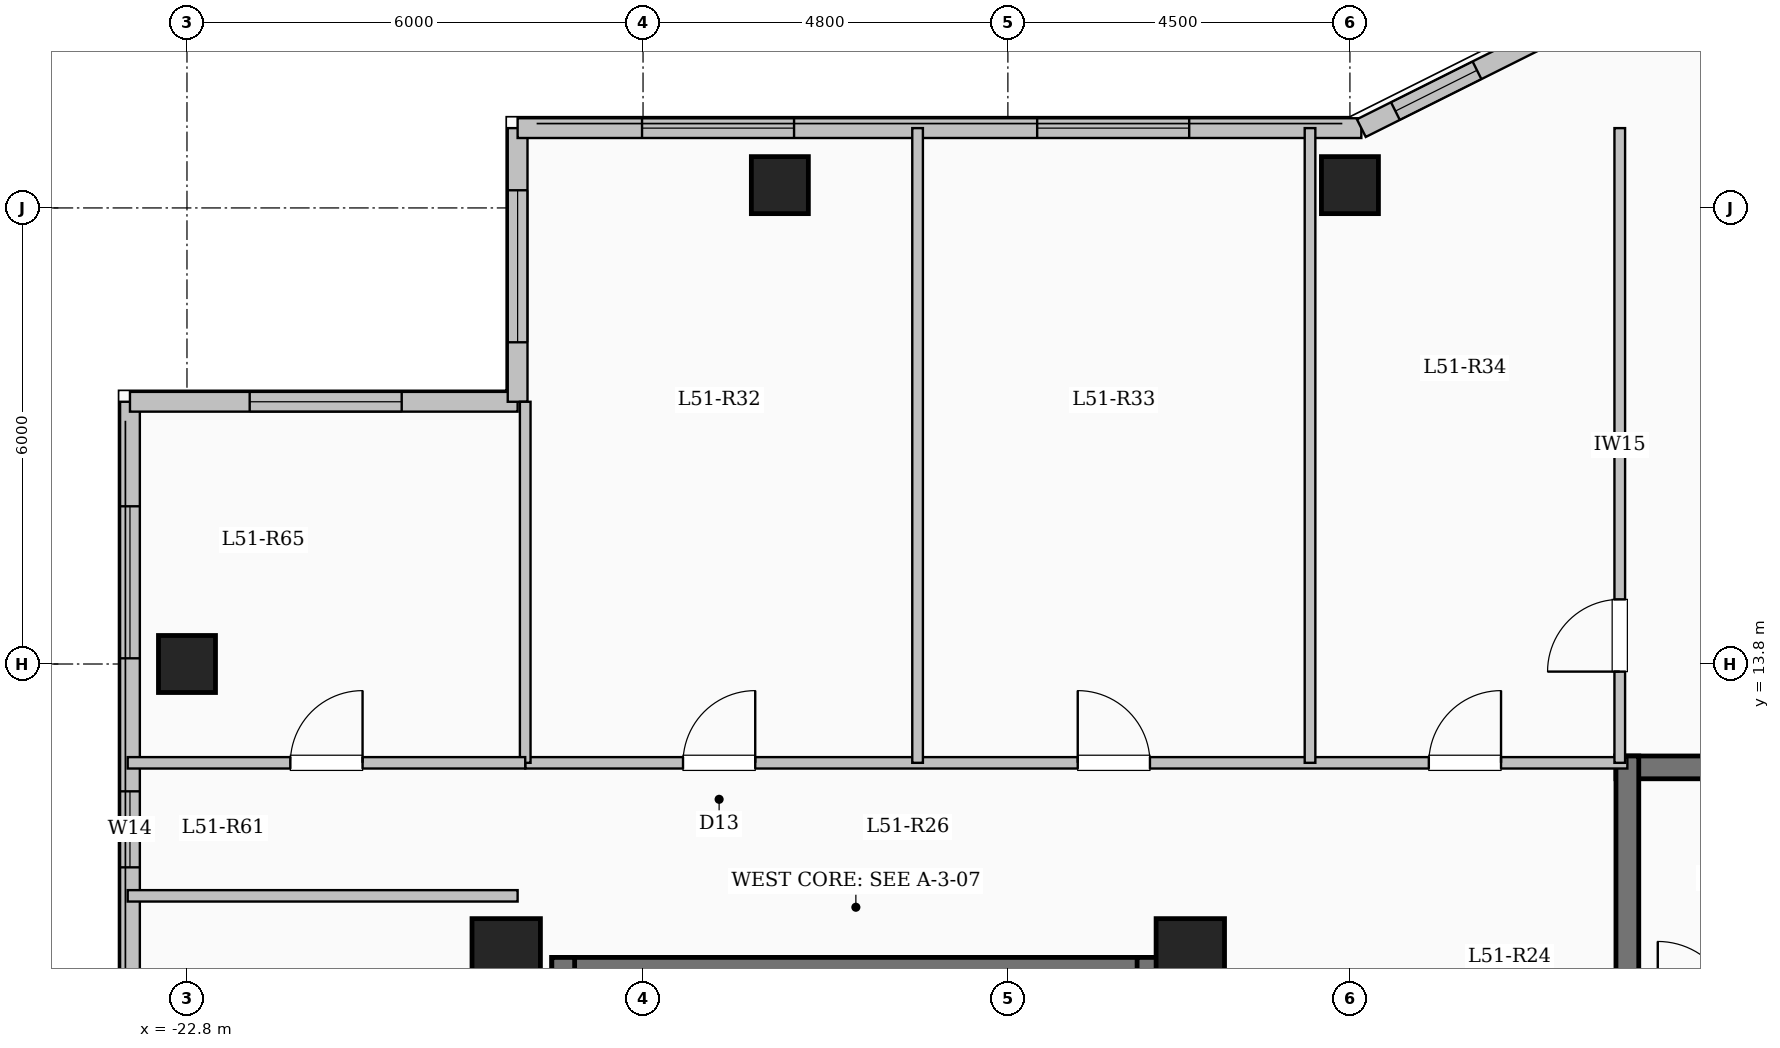
"""IFC4 building model, lengths in metres.
Left out: names, types, materials, properties, quantities, classifications, styles, units other than length and angle.
Written with IfcOpenShell. Run it as: python <this file> out.ifc"""

import sys

from ifc_helpers import new_model, si_unit, direction, frame, frame_2d, origin, origin_2d, place, context, subcontext, project, spatial, rectangle, extrude, element, fill, save


model = new_model("IFC4")
c1 = context("Model", 3, precision=1e-05, world=origin(), true_north=direction((0.0, 1.0)))
c2 = subcontext(c1, "Body", "Model", "MODEL_VIEW")
j1 = project(units=[si_unit("LENGTHUNIT", "METRE"), si_unit("PLANEANGLEUNIT", "RADIAN")], contexts=[c1])
p1 = place(None, origin())
s1 = spatial("IfcSite", under=j1, at=p1, CompositionType="ELEMENT")
p2 = place(p1, origin())
s2 = spatial("IfcBuilding", under=s1, at=p2, CompositionType="ELEMENT")
p3 = place(p2, frame((0.0, 0.0, 190.25)))
s3 = spatial("IfcBuildingStorey", under=s2, at=p3, CompositionType="ELEMENT", Elevation=190.25)
for number, where, z_axis, x_axis in (
    (1, (-9.6, 10.0, 0.0), (0.0, 0.0, 1.0), (1.0, 0.0, 0.0)),
    (2, (-18.6, 10.0, 0.0), (0.0, 0.0, 1.0), (1.0, 0.0, 0.0)),
):
    element("IfcColumn", number, at=place(p3, frame(where, z_axis=z_axis, x_axis=x_axis)), inside=s3, PredefinedType="COLUMN", context=c2, shape_type="SweptSolid", body=[
        extrude(rectangle(XDim=0.9, YDim=0.9, at=origin_2d()), origin(), (0.0, 0.0, 1.0), 3.35),
    ])
for number, where, z_axis, x_axis in (
    (3, (-15.0, 20.1, 0.0), (0.0, 0.0, 1.0), (1.0, 0.0, 0.0)),
    (4, (-7.5, 20.1, 0.0), (0.0, 0.0, 1.0), (1.0, 0.0, 0.0)),
    (5, (-22.8, 13.8, 0.0), (0.0, 0.0, 1.0), (1.0, 0.0, 0.0)),
):
    element("IfcColumn", number, at=place(p3, frame(where, z_axis=z_axis, x_axis=x_axis)), inside=s3, PredefinedType="COLUMN", context=c2, shape_type="SweptSolid", body=[
        extrude(rectangle(XDim=0.75, YDim=0.75, at=origin_2d()), origin(), (0.0, 0.0, 1.0), 3.35),
    ])
p4 = place(p3, frame((-23.55, -17.25, 0.0), z_axis=(0.0, 0.0, 1.0), x_axis=(0.0, 1.0, 0.0)))
e6 = element("IfcWall", 6, at=p4, inside=s3, PredefinedType="SOLIDWALL", context=c2, shape_type="SweptSolid", body=[
    extrude(rectangle(XDim=34.5, YDim=0.26, at=frame_2d((17.25, 0.0))), origin(), (0.0, 0.0, 1.0), 3.1),
])
p5 = place(p4, frame((2.825, 0.0, 0.9)))
e7 = element("IfcOpeningElement", 7, at=p5, cuts=e6, PredefinedType="OPENING", context=c2, shape_type="SweptSolid", body=[
    extrude(rectangle(XDim=2.2, YDim=1.75, at=frame_2d((1.1, 0.875))), frame((0.0, 0.14, 0.0), z_axis=(0.0, -1.0, 0.0), x_axis=(1.0, 0.0, 0.0)), (0.0, 0.0, 1.0), 0.28),
])
p6 = place(p4, frame((8.325, 0.0, 0.95)))
e8 = element("IfcOpeningElement", 8, at=p6, cuts=e6, PredefinedType="OPENING", context=c2, shape_type="SweptSolid", body=[
    extrude(rectangle(XDim=1.2, YDim=1.5, at=frame_2d((0.6, 0.75))), frame((0.0, 0.14, 0.0), z_axis=(0.0, -1.0, 0.0), x_axis=(1.0, 0.0, 0.0)), (0.0, 0.0, 1.0), 0.28),
])
p7 = place(p4, frame((18.0, 0.0, 0.9)))
e9 = element("IfcOpeningElement", 9, at=p7, cuts=e6, PredefinedType="OPENING", context=c2, shape_type="SweptSolid", body=[
    extrude(rectangle(XDim=2.0, YDim=1.7, at=frame_2d((1.0, 0.85))), frame((0.0, 0.14, 0.0), z_axis=(0.0, -1.0, 0.0), x_axis=(1.0, 0.0, 0.0)), (0.0, 0.0, 1.0), 0.28),
])
p8 = place(p4, frame((28.375, 0.0, 0.95)))
e10 = element("IfcOpeningElement", 10, at=p8, cuts=e6, PredefinedType="OPENING", context=c2, shape_type="SweptSolid", body=[
    extrude(rectangle(XDim=1.0, YDim=1.5, at=frame_2d((0.5, 0.75))), frame((0.0, 0.14, 0.0), z_axis=(0.0, -1.0, 0.0), x_axis=(1.0, 0.0, 0.0)), (0.0, 0.0, 1.0), 0.28),
])
p9 = place(p4, frame((31.125, 0.0, 0.9)))
e11 = element("IfcOpeningElement", 11, at=p9, cuts=e6, PredefinedType="OPENING", context=c2, shape_type="SweptSolid", body=[
    extrude(rectangle(XDim=2.0, YDim=1.7, at=frame_2d((1.0, 0.85))), frame((0.0, 0.14, 0.0), z_axis=(0.0, -1.0, 0.0), x_axis=(1.0, 0.0, 0.0)), (0.0, 0.0, 1.0), 0.28),
])
p10 = place(p3, frame((-23.55, 17.25, 0.0), z_axis=(0.0, 0.0, 1.0), x_axis=(1.0, 0.0, 0.0)))
e12 = element("IfcWall", 12, at=p10, inside=s3, PredefinedType="SOLIDWALL", context=c2, shape_type="SweptSolid", body=[
    extrude(rectangle(XDim=5.1, YDim=0.26, at=frame_2d((2.55, 0.0))), origin(), (0.0, 0.0, 1.0), 3.1),
])
p11 = place(p10, frame((1.575, 0.0, 0.9)))
e13 = element("IfcOpeningElement", 13, at=p11, cuts=e12, PredefinedType="OPENING", context=c2, shape_type="SweptSolid", body=[
    extrude(rectangle(XDim=2.0, YDim=1.7, at=frame_2d((1.0, 0.85))), frame((0.0, 0.14, 0.0), z_axis=(0.0, -1.0, 0.0), x_axis=(1.0, 0.0, 0.0)), (0.0, 0.0, 1.0), 0.28),
])
p12 = place(p3, frame((-18.45, 17.25, 0.0), z_axis=(0.0, 0.0, 1.0), x_axis=(0.0, 1.0, 0.0)))
e14 = element("IfcWall", 14, at=p12, inside=s3, PredefinedType="SOLIDWALL", context=c2, shape_type="SweptSolid", body=[
    extrude(rectangle(XDim=3.6, YDim=0.26, at=frame_2d((1.8, 0.0))), origin(), (0.0, 0.0, 1.0), 3.1),
])
p13 = place(p12, frame((0.782, 0.0, 0.9)))
e15 = element("IfcOpeningElement", 15, at=p13, cuts=e14, PredefinedType="OPENING", context=c2, shape_type="SweptSolid", body=[
    extrude(rectangle(XDim=2.0, YDim=1.7, at=frame_2d((1.0, 0.85))), frame((0.0, 0.14, 0.0), z_axis=(0.0, -1.0, 0.0), x_axis=(1.0, 0.0, 0.0)), (0.0, 0.0, 1.0), 0.28),
])
p14 = place(p3, frame((-18.45, 20.85, 0.0), z_axis=(0.0, 0.0, 1.0), x_axis=(1.0, 0.0, 0.0)))
e16 = element("IfcWall", 16, at=p14, inside=s3, PredefinedType="SOLIDWALL", context=c2, shape_type="SweptSolid", body=[
    extrude(rectangle(XDim=11.1, YDim=0.26, at=frame_2d((5.55, 0.0))), origin(), (0.0, 0.0, 1.0), 3.1),
])
p15 = place(p14, frame((1.637, 0.0, 0.9)))
e17 = element("IfcOpeningElement", 17, at=p15, cuts=e16, PredefinedType="OPENING", context=c2, shape_type="SweptSolid", body=[
    extrude(rectangle(XDim=2.0, YDim=1.7, at=frame_2d((1.0, 0.85))), frame((0.0, 0.14, 0.0), z_axis=(0.0, -1.0, 0.0), x_axis=(1.0, 0.0, 0.0)), (0.0, 0.0, 1.0), 0.28),
])
p16 = place(p14, frame((6.835, 0.0, 0.9)))
e18 = element("IfcOpeningElement", 18, at=p16, cuts=e16, PredefinedType="OPENING", context=c2, shape_type="SweptSolid", body=[
    extrude(rectangle(XDim=2.0, YDim=1.7, at=frame_2d((1.0, 0.85))), frame((0.0, 0.14, 0.0), z_axis=(0.0, -1.0, 0.0), x_axis=(1.0, 0.0, 0.0)), (0.0, 0.0, 1.0), 0.28),
])
p17 = place(p3, frame((-7.35, 20.85, 0.0), z_axis=(0.0, 0.0, 1.0), x_axis=(0.894427191, 0.4472135955, 0.0)))
e19 = element("IfcWall", 19, at=p17, inside=s3, PredefinedType="SOLIDWALL", context=c2, shape_type="SweptSolid", body=[
    extrude(rectangle(XDim=3.354, YDim=0.26, at=frame_2d((1.677, 0.0))), origin(), (0.0, 0.0, 1.0), 3.1),
])
p18 = place(p17, frame((0.501, 0.0, 0.95)))
e20 = element("IfcOpeningElement", 20, at=p18, cuts=e19, PredefinedType="OPENING", context=c2, shape_type="SweptSolid", body=[
    extrude(rectangle(XDim=1.2, YDim=1.5, at=frame_2d((0.6, 0.75))), frame((0.0, 0.14, 0.0), z_axis=(0.0, -1.0, 0.0), x_axis=(1.0, 0.0, 0.0)), (0.0, 0.0, 1.0), 0.28),
])
p19 = place(p3, frame((-18.0, 9.79, 0.0), z_axis=(0.0, 0.0, 1.0), x_axis=(1.0, 0.0, 0.0)))
e21 = element("IfcWall", 21, at=p19, inside=s3, PredefinedType="SHEAR", context=c2, shape_type="SweptSolid", body=[
    extrude(rectangle(XDim=8.0, YDim=0.3, at=frame_2d((4.0, 0.0))), origin(), (0.0, 0.0, 1.0), 3.35),
])
for number, where, z_axis, x_axis in (
    (22, (-17.85, 6.35, 0.0), (0.0, 0.0, 1.0), (0.0, 1.0, 0.0)),
    (23, (-10.15, 6.35, 0.0), (0.0, 0.0, 1.0), (0.0, 1.0, 0.0)),
):
    element("IfcWall", number, at=place(p3, frame(where, z_axis=z_axis, x_axis=x_axis)), inside=s3, PredefinedType="SHEAR", context=c2, shape_type="SweptSolid", body=[
        extrude(rectangle(XDim=3.59, YDim=0.3, at=frame_2d((1.795, 0.0))), origin(), (0.0, 0.0, 1.0), 3.35),
    ])
p20 = place(p3, frame((-4.0, 12.44, 0.0), z_axis=(0.0, 0.0, 1.0), x_axis=(1.0, 0.0, 0.0)))
e24 = element("IfcWall", 24, at=p20, inside=s3, PredefinedType="SHEAR", context=c2, shape_type="SweptSolid", body=[
    extrude(rectangle(XDim=8.0, YDim=0.3, at=frame_2d((4.0, 0.0))), origin(), (0.0, 0.0, 1.0), 3.35),
])
p21 = place(p3, frame((-3.85, 9.0, 0.0), z_axis=(0.0, 0.0, 1.0), x_axis=(0.0, 1.0, 0.0)))
e25 = element("IfcWall", 25, at=p21, inside=s3, PredefinedType="SHEAR", context=c2, shape_type="SweptSolid", body=[
    extrude(rectangle(XDim=3.59, YDim=0.3, at=frame_2d((1.795, 0.0))), origin(), (0.0, 0.0, 1.0), 3.35),
])
p22 = place(p3, frame((-18.35, 12.5, 0.0), z_axis=(0.0, 0.0, 1.0), x_axis=(1.0, 0.0, 0.0)))
e26 = element("IfcWall", 26, at=p22, inside=s3, PredefinedType="PARTITIONING", context=c2, shape_type="SweptSolid", body=[
    extrude(rectangle(XDim=14.5, YDim=0.15, at=frame_2d((7.25, 0.0))), origin(), (0.0, 0.0, 1.0), 3.1),
])
p23 = place(p22, frame((2.076, 0.0, 0.0)))
e27 = element("IfcOpeningElement", 27, at=p23, cuts=e26, PredefinedType="OPENING", context=c2, shape_type="SweptSolid", body=[
    extrude(rectangle(XDim=0.95, YDim=2.15, at=frame_2d((0.475, 1.075))), frame((0.0, 0.085, 0.0), z_axis=(0.0, -1.0, 0.0), x_axis=(1.0, 0.0, 0.0)), (0.0, 0.0, 1.0), 0.17),
])
p24 = place(p22, frame((7.269, 0.0, 0.0)))
e28 = element("IfcOpeningElement", 28, at=p24, cuts=e26, PredefinedType="OPENING", context=c2, shape_type="SweptSolid", body=[
    extrude(rectangle(XDim=0.95, YDim=2.15, at=frame_2d((0.475, 1.075))), frame((0.0, 0.085, 0.0), z_axis=(0.0, -1.0, 0.0), x_axis=(1.0, 0.0, 0.0)), (0.0, 0.0, 1.0), 0.17),
])
p25 = place(p22, frame((11.888, 0.0, 0.0)))
e29 = element("IfcOpeningElement", 29, at=p25, cuts=e26, PredefinedType="OPENING", context=c2, shape_type="SweptSolid", body=[
    extrude(rectangle(XDim=0.95, YDim=2.15, at=frame_2d((0.475, 1.075))), frame((0.0, 0.085, 0.0), z_axis=(0.0, -1.0, 0.0), x_axis=(1.0, 0.0, 0.0)), (0.0, 0.0, 1.0), 0.17),
])
p26 = place(p3, frame((-3.95, 12.5, 0.0), z_axis=(0.0, 0.0, 1.0), x_axis=(0.0, 1.0, 0.0)))
e30 = element("IfcWall", 30, at=p26, inside=s3, PredefinedType="PARTITIONING", context=c2, shape_type="SweptSolid", body=[
    extrude(rectangle(XDim=8.35, YDim=0.14, at=frame_2d((4.175, 0.0))), origin(), (0.0, 0.0, 1.0), 3.1),
])
p27 = place(p26, frame((1.2, 0.0, 0.0)))
e31 = element("IfcOpeningElement", 31, at=p27, cuts=e30, PredefinedType="OPENING", context=c2, shape_type="SweptSolid", body=[
    extrude(rectangle(XDim=0.95, YDim=2.15, at=frame_2d((0.475, 1.075))), frame((0.0, 0.08, 0.0), z_axis=(0.0, -1.0, 0.0), x_axis=(1.0, 0.0, 0.0)), (0.0, 0.0, 1.0), 0.16),
])
p28 = place(p3, frame((-13.188, 12.5, 0.0), z_axis=(0.0, 0.0, 1.0), x_axis=(0.0, 1.0, 0.0)))
e32 = element("IfcWall", 32, at=p28, inside=s3, PredefinedType="PARTITIONING", context=c2, shape_type="SweptSolid", body=[
    extrude(rectangle(XDim=8.35, YDim=0.14, at=frame_2d((4.175, 0.0))), origin(), (0.0, 0.0, 1.0), 3.1),
])
p29 = place(p3, frame((-8.025, 12.5, 0.0), z_axis=(0.0, 0.0, 1.0), x_axis=(0.0, 1.0, 0.0)))
e33 = element("IfcWall", 33, at=p29, inside=s3, PredefinedType="PARTITIONING", context=c2, shape_type="SweptSolid", body=[
    extrude(rectangle(XDim=8.35, YDim=0.14, at=frame_2d((4.175, 0.0))), origin(), (0.0, 0.0, 1.0), 2.585),
])
p30 = place(p3, frame((-23.58, 10.75, 0.0), z_axis=(0.0, 0.0, 1.0), x_axis=(1.0, 0.0, 0.0)))
e34 = element("IfcWall", 34, at=p30, inside=s3, PredefinedType="PARTITIONING", context=c2, shape_type="SweptSolid", body=[
    extrude(rectangle(XDim=5.13, YDim=0.15, at=frame_2d((2.565, 0.0))), origin(), (0.0, 0.0, 1.0), 3.1),
])
p31 = place(p3, frame((-18.35, 12.5, 0.0), z_axis=(0.0, 0.0, 1.0), x_axis=(0.0, 1.0, 0.0)))
e35 = element("IfcWall", 35, at=p31, inside=s3, PredefinedType="PARTITIONING", context=c2, shape_type="SweptSolid", body=[
    extrude(rectangle(XDim=4.75, YDim=0.14, at=frame_2d((2.375, 0.0))), origin(), (0.0, 0.0, 1.0), 3.1),
])
p32 = place(p3, frame((-23.58, 12.5, 0.0), z_axis=(0.0, 0.0, 1.0), x_axis=(1.0, 0.0, 0.0)))
e36 = element("IfcWall", 36, at=p32, inside=s3, PredefinedType="PARTITIONING", context=c2, shape_type="SweptSolid", body=[
    extrude(rectangle(XDim=5.23, YDim=0.15, at=frame_2d((2.615, 0.0))), origin(), (0.0, 0.0, 1.0), 3.1),
])
p33 = place(p32, frame((2.14, 0.0, 0.0)))
e37 = element("IfcOpeningElement", 37, at=p33, cuts=e36, PredefinedType="OPENING", context=c2, shape_type="SweptSolid", body=[
    extrude(rectangle(XDim=0.95, YDim=2.15, at=frame_2d((0.475, 1.075))), frame((0.0, 0.085, 0.0), z_axis=(0.0, -1.0, 0.0), x_axis=(1.0, 0.0, 0.0)), (0.0, 0.0, 1.0), 0.17),
])
p34 = place(p8, origin())
e38 = element("IfcWindow", 38, at=p34, inside=s3, PartitioningType="SINGLE_PANEL", PredefinedType="WINDOW", context=c2, shape_type="SweptSolid", body=[
    extrude(rectangle(XDim=1.0, YDim=1.5, at=frame_2d((0.5, 0.75))), frame((0.0, 0.03, 0.0), z_axis=(0.0, -1.0, 0.0), x_axis=(1.0, 0.0, 0.0)), (0.0, 0.0, 1.0), 0.06),
])
fill(e10, e38)
p35 = place(p9, origin())
e39 = element("IfcWindow", 39, at=p35, inside=s3, PartitioningType="SINGLE_PANEL", PredefinedType="WINDOW", context=c2, shape_type="SweptSolid", body=[
    extrude(rectangle(XDim=2.0, YDim=1.7, at=frame_2d((1.0, 0.85))), frame((0.0, 0.03, 0.0), z_axis=(0.0, -1.0, 0.0), x_axis=(1.0, 0.0, 0.0)), (0.0, 0.0, 1.0), 0.06),
])
fill(e11, e39)
p36 = place(p11, origin())
e40 = element("IfcWindow", 40, at=p36, inside=s3, PartitioningType="SINGLE_PANEL", PredefinedType="WINDOW", context=c2, shape_type="SweptSolid", body=[
    extrude(rectangle(XDim=2.0, YDim=1.7, at=frame_2d((1.0, 0.85))), frame((0.0, 0.03, 0.0), z_axis=(0.0, -1.0, 0.0), x_axis=(1.0, 0.0, 0.0)), (0.0, 0.0, 1.0), 0.06),
])
fill(e13, e40)
p37 = place(p13, origin())
e41 = element("IfcWindow", 41, at=p37, inside=s3, PartitioningType="SINGLE_PANEL", PredefinedType="WINDOW", context=c2, shape_type="SweptSolid", body=[
    extrude(rectangle(XDim=2.0, YDim=1.7, at=frame_2d((1.0, 0.85))), frame((0.0, 0.03, 0.0), z_axis=(0.0, -1.0, 0.0), x_axis=(1.0, 0.0, 0.0)), (0.0, 0.0, 1.0), 0.06),
])
fill(e15, e41)
p38 = place(p15, origin())
e42 = element("IfcWindow", 42, at=p38, inside=s3, PartitioningType="SINGLE_PANEL", PredefinedType="WINDOW", context=c2, shape_type="SweptSolid", body=[
    extrude(rectangle(XDim=2.0, YDim=1.7, at=frame_2d((1.0, 0.85))), frame((0.0, 0.03, 0.0), z_axis=(0.0, -1.0, 0.0), x_axis=(1.0, 0.0, 0.0)), (0.0, 0.0, 1.0), 0.06),
])
fill(e17, e42)
p39 = place(p16, origin())
e43 = element("IfcWindow", 43, at=p39, inside=s3, PartitioningType="SINGLE_PANEL", PredefinedType="WINDOW", context=c2, shape_type="SweptSolid", body=[
    extrude(rectangle(XDim=2.0, YDim=1.7, at=frame_2d((1.0, 0.85))), frame((0.0, 0.03, 0.0), z_axis=(0.0, -1.0, 0.0), x_axis=(1.0, 0.0, 0.0)), (0.0, 0.0, 1.0), 0.06),
])
fill(e18, e43)
p40 = place(p18, origin())
e44 = element("IfcWindow", 44, at=p40, inside=s3, PartitioningType="SINGLE_PANEL", PredefinedType="WINDOW", context=c2, shape_type="SweptSolid", body=[
    extrude(rectangle(XDim=1.2, YDim=1.5, at=frame_2d((0.6, 0.75))), frame((0.0, 0.03, 0.0), z_axis=(0.0, -1.0, 0.0), x_axis=(1.0, 0.0, 0.0)), (0.0, 0.0, 1.0), 0.06),
])
fill(e20, e44)
p41 = place(p23, origin())
e45 = element("IfcDoor", 45, at=p41, inside=s3, OperationType="SINGLE_SWING_RIGHT", PredefinedType="DOOR", context=c2, shape_type="SweptSolid", body=[
    extrude(rectangle(XDim=0.95, YDim=2.15, at=frame_2d((0.475, 1.075))), frame((0.0, 0.025, 0.0), z_axis=(0.0, -1.0, 0.0), x_axis=(1.0, 0.0, 0.0)), (0.0, 0.0, 1.0), 0.05),
])
fill(e27, e45)
p42 = place(p24, origin())
e46 = element("IfcDoor", 46, at=p42, inside=s3, OperationType="SINGLE_SWING_LEFT", PredefinedType="DOOR", context=c2, shape_type="SweptSolid", body=[
    extrude(rectangle(XDim=0.95, YDim=2.15, at=frame_2d((0.475, 1.075))), frame((0.0, 0.025, 0.0), z_axis=(0.0, -1.0, 0.0), x_axis=(1.0, 0.0, 0.0)), (0.0, 0.0, 1.0), 0.05),
])
fill(e28, e46)
p43 = place(p25, origin())
e47 = element("IfcDoor", 47, at=p43, inside=s3, OperationType="SINGLE_SWING_RIGHT", PredefinedType="DOOR", context=c2, shape_type="SweptSolid", body=[
    extrude(rectangle(XDim=0.95, YDim=2.15, at=frame_2d((0.475, 1.075))), frame((0.0, 0.025, 0.0), z_axis=(0.0, -1.0, 0.0), x_axis=(1.0, 0.0, 0.0)), (0.0, 0.0, 1.0), 0.05),
])
fill(e29, e47)
p44 = place(p27, origin())
e48 = element("IfcDoor", 48, at=p44, inside=s3, OperationType="SINGLE_SWING_LEFT", PredefinedType="DOOR", context=c2, shape_type="SweptSolid", body=[
    extrude(rectangle(XDim=0.95, YDim=2.15, at=frame_2d((0.475, 1.075))), frame((0.0, 0.025, 0.0), z_axis=(0.0, -1.0, 0.0), x_axis=(1.0, 0.0, 0.0)), (0.0, 0.0, 1.0), 0.05),
])
fill(e31, e48)
p45 = place(p33, origin())
e49 = element("IfcDoor", 49, at=p45, inside=s3, OperationType="SINGLE_SWING_RIGHT", PredefinedType="DOOR", context=c2, shape_type="SweptSolid", body=[
    extrude(rectangle(XDim=0.95, YDim=2.15, at=frame_2d((0.475, 1.075))), frame((0.0, 0.025, 0.0), z_axis=(0.0, -1.0, 0.0), x_axis=(1.0, 0.0, 0.0)), (0.0, 0.0, 1.0), 0.05),
])
fill(e37, e49)
save(model, sys.argv[1])
